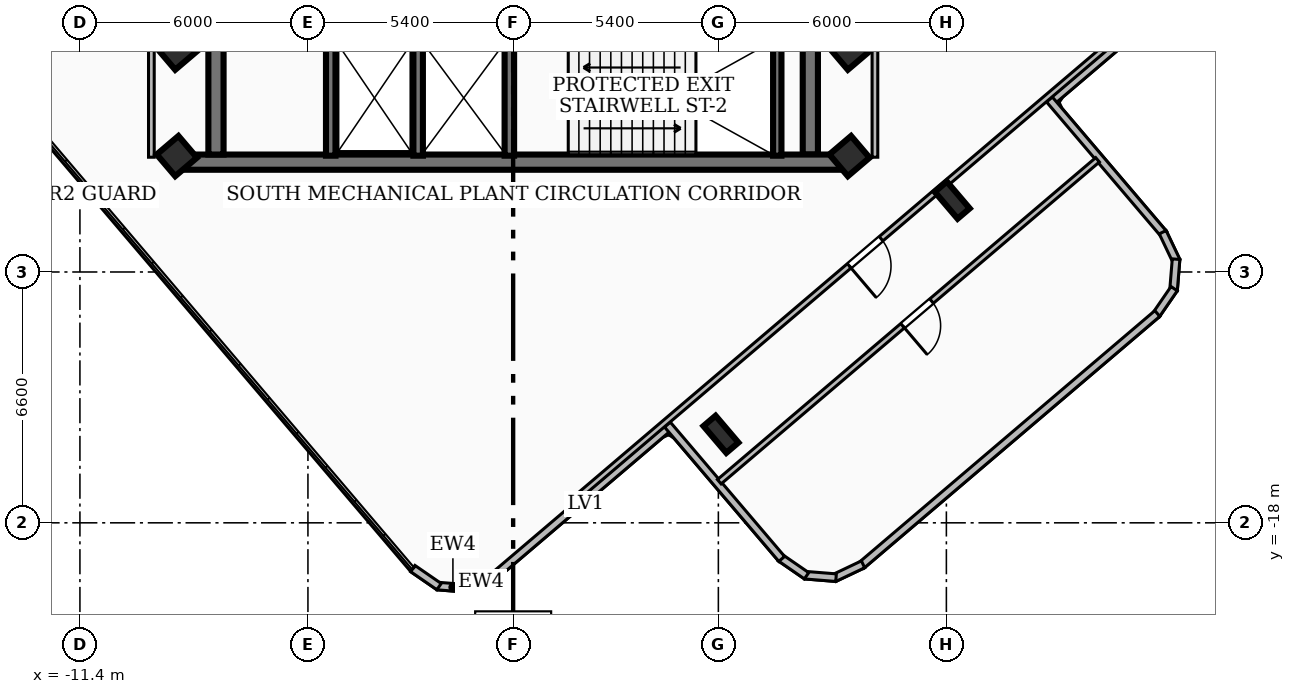
"""IFC4 building model, lengths in metres.
Left out: names, types, materials, properties, quantities, classifications, styles, units other than length and angle.
Written with IfcOpenShell. Run it as: python <this file> out.ifc"""

import sys

from ifc_helpers import new_model, si_unit, direction, frame, frame_2d, origin, origin_2d, place, context, subcontext, project, spatial, rectangle, i_section, extrude, element, fill, save


model = new_model("IFC4")
c1 = context("Model", 3, precision=1e-05, world=origin(), true_north=direction((0.0, 1.0)))
c2 = subcontext(c1, "Body", "Model", "MODEL_VIEW")
j1 = project(units=[si_unit("LENGTHUNIT", "METRE"), si_unit("PLANEANGLEUNIT", "RADIAN")], contexts=[c1])
p1 = place(None, origin())
s1 = spatial("IfcSite", under=j1, at=p1, CompositionType="ELEMENT")
p2 = place(p1, origin())
s2 = spatial("IfcBuilding", under=s1, at=p2, CompositionType="ELEMENT")
p3 = place(p2, frame((0.0, 0.0, 239.4)))
s3 = spatial("IfcBuildingStorey", under=s2, at=p3, CompositionType="ELEMENT", Elevation=239.4)
p4 = place(p3, frame((8.78, -8.51, 0.0), z_axis=(0.0, 0.0, 1.0), x_axis=(-1.0, 0.0, 0.0)))
e1 = element("IfcWall", 1, at=p4, inside=s3, PredefinedType="SHEAR", context=c2, shape_type="SweptSolid", body=[
    extrude(rectangle(XDim=17.56, YDim=0.4, at=frame_2d((8.78, 0.0))), origin(), (0.0, 0.0, 1.0), 4.42),
])
for number, where, z_axis, x_axis in (
    (2, (-7.82, -8.31, 0.0), (0.0, 0.0, 1.0), (0.0, 1.0, 0.0)),
    (3, (7.82, -1.95, 0.0), (0.0, 0.0, 1.0), (0.0, -1.0, 0.0)),
):
    element("IfcWall", number, at=place(p3, frame(where, z_axis=z_axis, x_axis=x_axis)), inside=s3, PredefinedType="SHEAR", context=c2, shape_type="SweptSolid", body=[
        extrude(rectangle(XDim=6.36, YDim=0.4, at=frame_2d((3.18, 0.0))), origin(), (0.0, 0.0, 1.0), 4.42),
    ])
p5 = place(p3, frame((6.95, -8.34, 0.0), z_axis=(0.0, 0.0, 1.0), x_axis=(0.0, 1.0, 0.0)))
e4 = element("IfcWall", 4, at=p5, inside=s3, PredefinedType="SOLIDWALL", context=c2, shape_type="SweptSolid", body=[
    extrude(rectangle(XDim=3.06, YDim=0.22, at=frame_2d((1.53, 0.0))), origin(), (0.0, 0.0, 1.0), 4.42),
])
for number, where, z_axis, x_axis in (
    (5, (-0.1, -8.34, 0.0), (0.0, 0.0, 1.0), (0.0, 1.0, 0.0)),
    (6, (-2.5, -8.34, 0.0), (0.0, 0.0, 1.0), (0.0, 1.0, 0.0)),
    (7, (-4.8, -8.34, 0.0), (0.0, 0.0, 1.0), (0.0, 1.0, 0.0)),
):
    element("IfcWall", number, at=place(p3, frame(where, z_axis=z_axis, x_axis=x_axis)), inside=s3, PredefinedType="SOLIDWALL", context=c2, shape_type="SweptSolid", body=[
        extrude(rectangle(XDim=3.04, YDim=0.25, at=frame_2d((1.52, 0.0))), origin(), (0.0, 0.0, 1.0), 4.42),
    ])
for number, where, z_axis, x_axis in (
    (8, (-8.85, -5.55, 0.0), (0.0, 0.0, 1.0), (0.762, 0.648, 0.0)),
    (9, (8.85, -5.55, 0.0), (0.0, 0.0, 1.0), (0.762, 0.648, 0.0)),
    (10, (8.85, -8.35, 0.0), (0.0, 0.0, 1.0), (0.762, 0.648, 0.0)),
    (11, (-8.85, -8.35, 0.0), (0.0, 0.0, 1.0), (0.762, 0.648, 0.0)),
):
    element("IfcColumn", number, at=place(p3, frame(where, z_axis=z_axis, x_axis=x_axis)), inside=s3, PredefinedType="COLUMN", context=c2, shape_type="SweptSolid", body=[
        extrude(rectangle(XDim=0.75, YDim=0.75, at=origin_2d()), origin(), (0.0, 0.0, 1.0), 4.68),
    ])
for number, where, z_axis, x_axis in (
    (12, (5.468, -15.671, 0.0), (0.0, 0.0, 1.0), (0.762, 0.648, 0.0)),
    (13, (11.554, -9.51, 0.0), (0.0, 0.0, 1.0), (0.762, 0.648, 0.0)),
):
    element("IfcColumn", number, at=place(p3, frame(where, z_axis=z_axis, x_axis=x_axis)), inside=s3, PredefinedType="COLUMN", context=c2, shape_type="SweptSolid", body=[
        extrude(i_section(OverallWidth=0.418, OverallDepth=0.927, WebThickness=0.019, FlangeThickness=0.032, at=origin_2d()), origin(), (0.0, 0.0, 1.0), 4.68),
    ])
p6 = place(p3, frame((4.172, -15.424, 0.0), z_axis=(0.0, 0.0, 1.0), x_axis=(-0.761580290689, -0.648070567789, 0.0)))
e14 = element("IfcWall", 14, at=p6, inside=s3, PredefinedType="SOLIDWALL", context=c2, shape_type="SweptSolid", body=[
    extrude(rectangle(XDim=6.143, YDim=0.2, at=frame_2d((3.071, 0.0))), origin(), (0.0, 0.0, 1.0), 2.212),
])
p7 = place(p3, frame((-0.464, -19.378, 0.0), z_axis=(0.0, 0.0, 1.0), x_axis=(-0.903209829664, -0.429199258619, 0.0)))
e15 = element("IfcWall", 15, at=p7, inside=s3, PredefinedType="SOLIDWALL", context=c2, shape_type="SweptSolid", body=[
    extrude(rectangle(XDim=0.839, YDim=0.2, at=frame_2d((0.419, 0.0))), origin(), (0.0, 0.0, 1.0), 4.42),
])
p8 = place(p3, frame((-1.174, -19.729, 0.0), z_axis=(0.0, 0.0, 1.0), x_axis=(-0.996800199392, 0.079933487923, 0.0)))
e16 = element("IfcWall", 16, at=p8, inside=s3, PredefinedType="SOLIDWALL", context=c2, shape_type="SweptSolid", body=[
    extrude(rectangle(XDim=0.825, YDim=0.2, at=frame_2d((0.412, 0.0))), origin(), (0.0, 0.0, 1.0), 4.42),
])
p9 = place(p3, frame((-1.95, -19.679, 0.0), z_axis=(0.0, 0.0, 1.0), x_axis=(-0.823540820379, 0.567257011565, 0.0)))
e17 = element("IfcWall", 17, at=p9, inside=s3, PredefinedType="SOLIDWALL", context=c2, shape_type="SweptSolid", body=[
    extrude(rectangle(XDim=0.839, YDim=0.2, at=frame_2d((0.42, 0.0))), origin(), (0.0, 0.0, 1.0), 4.42),
])
p10 = place(p3, frame((19.236, -2.604, 0.0), z_axis=(0.0, 0.0, 1.0), x_axis=(-0.761575518431, -0.648076175867, 0.0)))
e18 = element("IfcWall", 18, at=p10, inside=s3, PredefinedType="SOLIDWALL", context=c2, shape_type="SweptSolid", body=[
    extrude(rectangle(XDim=6.741, YDim=0.2, at=frame_2d((3.371, 0.0))), origin(), (0.0, 0.0, 1.0), 4.42),
])
p11 = place(p3, frame((14.111, -6.86, 0.0), z_axis=(0.0, 0.0, 1.0), x_axis=(0.648040740079, -0.761605671721, 0.0)))
e19 = element("IfcWall", 19, at=p11, inside=s3, PredefinedType="SOLIDWALL", context=c2, shape_type="SweptSolid", body=[
    extrude(rectangle(XDim=4.641, YDim=0.2, at=frame_2d((2.321, 0.0))), origin(), (0.0, 0.0, 1.0), 4.42),
])
p12 = place(p3, frame((17.092, -10.353, 0.0), z_axis=(0.0, 0.0, 1.0), x_axis=(0.42979812108, -0.902925010793, 0.0)))
e20 = element("IfcWall", 20, at=p12, inside=s3, PredefinedType="SOLIDWALL", context=c2, shape_type="SweptSolid", body=[
    extrude(rectangle(XDim=0.84, YDim=0.2, at=frame_2d((0.42, 0.0))), origin(), (0.0, 0.0, 1.0), 4.42),
])
p13 = place(p3, frame((17.444, -11.063, 0.0), z_axis=(0.0, 0.0, 1.0), x_axis=(-0.081404017248, -0.996681185724, 0.0)))
e21 = element("IfcWall", 21, at=p13, inside=s3, PredefinedType="SOLIDWALL", context=c2, shape_type="SweptSolid", body=[
    extrude(rectangle(XDim=0.825, YDim=0.2, at=frame_2d((0.412, 0.0))), origin(), (0.0, 0.0, 1.0), 4.42),
])
p14 = place(p3, frame((17.393, -11.839, 0.0), z_axis=(0.0, 0.0, 1.0), x_axis=(-0.566602962866, -0.823990948052, 0.0)))
e22 = element("IfcWall", 22, at=p14, inside=s3, PredefinedType="SOLIDWALL", context=c2, shape_type="SweptSolid", body=[
    extrude(rectangle(XDim=0.839, YDim=0.2, at=frame_2d((0.419, 0.0))), origin(), (0.0, 0.0, 1.0), 4.42),
])
p15 = place(p3, frame((16.951, -12.493, 0.0), z_axis=(0.0, 0.0, 1.0), x_axis=(-0.761554435907, -0.648100949814, 0.0)))
e23 = element("IfcWall", 23, at=p15, inside=s3, PredefinedType="SOLIDWALL", context=c2, shape_type="SweptSolid", body=[
    extrude(rectangle(XDim=10.224, YDim=0.2, at=frame_2d((5.112, 0.0))), origin(), (0.0, 0.0, 1.0), 4.42),
])
p16 = place(p3, frame((9.207, -19.092, 0.0), z_axis=(0.0, 0.0, 1.0), x_axis=(-0.903376142734, -0.428849093201, 0.0)))
e24 = element("IfcWall", 24, at=p16, inside=s3, PredefinedType="SOLIDWALL", context=c2, shape_type="SweptSolid", body=[
    extrude(rectangle(XDim=0.839, YDim=0.2, at=frame_2d((0.419, 0.0))), origin(), (0.0, 0.0, 1.0), 4.42),
])
p17 = place(p3, frame((8.497, -19.443, 0.0), z_axis=(0.0, 0.0, 1.0), x_axis=(-0.996776567966, 0.080227635853, 0.0)))
e25 = element("IfcWall", 25, at=p17, inside=s3, PredefinedType="SOLIDWALL", context=c2, shape_type="SweptSolid", body=[
    extrude(rectangle(XDim=0.825, YDim=0.2, at=frame_2d((0.412, 0.0))), origin(), (0.0, 0.0, 1.0), 4.42),
])
p18 = place(p3, frame((7.721, -19.393, 0.0), z_axis=(0.0, 0.0, 1.0), x_axis=(-0.823447180448, 0.567392933524, 0.0)))
e26 = element("IfcWall", 26, at=p18, inside=s3, PredefinedType="SOLIDWALL", context=c2, shape_type="SweptSolid", body=[
    extrude(rectangle(XDim=0.839, YDim=0.2, at=frame_2d((0.419, 0.0))), origin(), (0.0, 0.0, 1.0), 4.42),
])
p19 = place(p3, frame((7.067, -18.95, 0.0), z_axis=(0.0, 0.0, 1.0), x_axis=(-0.648040740079, 0.761605671721, 0.0)))
e27 = element("IfcWall", 27, at=p19, inside=s3, PredefinedType="SOLIDWALL", context=c2, shape_type="SweptSolid", body=[
    extrude(rectangle(XDim=4.641, YDim=0.2, at=frame_2d((2.321, 0.0))), origin(), (0.0, 0.0, 1.0), 2.212),
])
p20 = place(p3, frame((-9.52, -8.38, 0.0), z_axis=(0.0, 0.0, 1.0), x_axis=(0.0, 1.0, 0.0)))
e28 = element("IfcWall", 28, at=p20, inside=s3, PredefinedType="PARTITIONING", context=c2, shape_type="SweptSolid", body=[
    extrude(rectangle(XDim=6.63, YDim=0.15, at=frame_2d((3.315, 0.0))), origin(), (0.0, 0.0, 1.0), 4.42),
])
p21 = place(p3, frame((9.52, -8.38, 0.0), z_axis=(0.0, 0.0, 1.0), x_axis=(0.0, 1.0, 0.0)))
e29 = element("IfcWall", 29, at=p21, inside=s3, PredefinedType="PARTITIONING", context=c2, shape_type="SweptSolid", body=[
    extrude(rectangle(XDim=6.63, YDim=0.15, at=frame_2d((3.315, 0.0))), origin(), (0.0, 0.0, 1.0), 2.212),
])
p22 = place(p3, frame((17.296, -4.045, 0.0), z_axis=(0.0, 0.0, 1.0), x_axis=(-0.761551896035, -0.648103934292, 0.0)))
e30 = element("IfcWall", 30, at=p22, inside=s3, PredefinedType="PARTITIONING", context=c2, shape_type="SweptSolid", body=[
    extrude(rectangle(XDim=20.5, YDim=0.15, at=frame_2d((10.25, 0.0))), origin(), (0.0, 0.0, 1.0), 2.212),
])
p23 = place(p22, frame((9.999, 0.0, 0.0)))
e31 = element("IfcOpeningElement", 31, at=p23, cuts=e30, PredefinedType="OPENING", context=c2, shape_type="SweptSolid", body=[
    extrude(rectangle(XDim=1.1, YDim=2.15, at=frame_2d((0.55, 1.075))), frame((0.0, 0.085, 0.0), z_axis=(0.0, -1.0, 0.0), x_axis=(1.0, 0.0, 0.0)), (0.0, 0.0, 1.0), 0.17),
])
p24 = place(p3, frame((15.378, -8.449, 0.0), z_axis=(0.0, 0.0, 1.0), x_axis=(-0.761592155386, -0.648056624729, 0.0)))
e32 = element("IfcWall", 32, at=p24, inside=s3, PredefinedType="PARTITIONING", context=c2, shape_type="SweptSolid", body=[
    extrude(rectangle(XDim=13.07, YDim=0.15, at=frame_2d((6.535, 0.0))), origin(), (0.0, 0.0, 1.0), 2.212),
])
p25 = place(p24, frame((5.735, 0.0, 0.0)))
e33 = element("IfcOpeningElement", 33, at=p25, cuts=e32, PredefinedType="OPENING", context=c2, shape_type="SweptSolid", body=[
    extrude(rectangle(XDim=1.0, YDim=2.1, at=frame_2d((0.5, 1.05))), frame((0.0, 0.085, 0.0), z_axis=(0.0, -1.0, 0.0), x_axis=(1.0, 0.0, 0.0)), (0.0, 0.0, 1.0), 0.17),
])
p26 = place(p23, origin())
e34 = element("IfcDoor", 34, at=p26, inside=s3, OperationType="SINGLE_SWING_RIGHT", PredefinedType="DOOR", context=c2, shape_type="SweptSolid", body=[
    extrude(rectangle(XDim=1.1, YDim=2.15, at=frame_2d((0.55, 1.075))), frame((0.0, 0.025, 0.0), z_axis=(0.0, -1.0, 0.0), x_axis=(1.0, 0.0, 0.0)), (0.0, 0.0, 1.0), 0.05),
])
fill(e31, e34)
p27 = place(p25, origin())
e35 = element("IfcDoor", 35, at=p27, inside=s3, OperationType="SINGLE_SWING_RIGHT", PredefinedType="DOOR", context=c2, shape_type="SweptSolid", body=[
    extrude(rectangle(XDim=1.0, YDim=2.1, at=frame_2d((0.5, 1.05))), frame((0.0, 0.025, 0.0), z_axis=(0.0, -1.0, 0.0), x_axis=(1.0, 0.0, 0.0)), (0.0, 0.0, 1.0), 0.05),
])
fill(e33, e35)
save(model, sys.argv[1])
